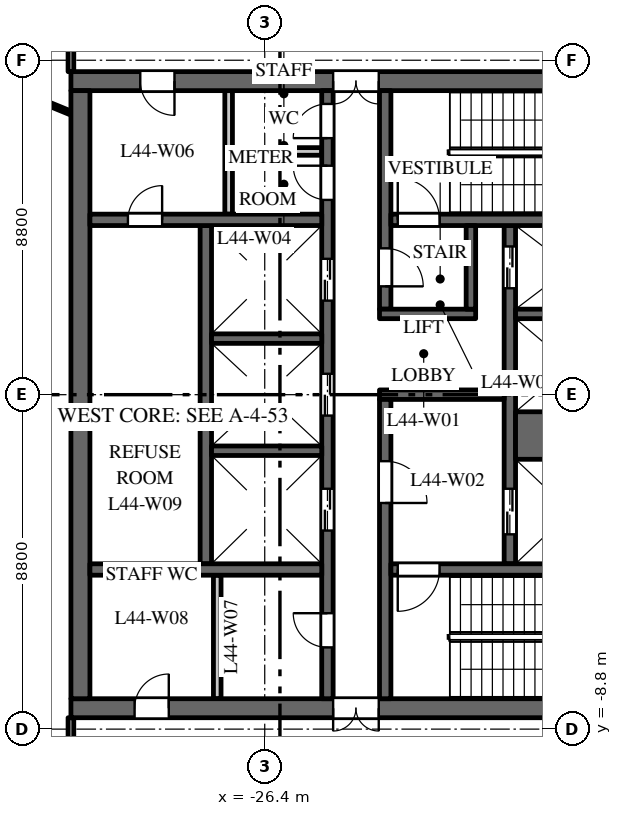
"""IFC4 building model, lengths in metres.
Left out: names, types, materials, properties, quantities, classifications, styles, units other than length and angle.
Written with IfcOpenShell. Run it as: python <this file> out.ifc"""

import sys

from ifc_helpers import new_model, si_unit, direction, frame, frame_2d, origin, place, context, subcontext, project, spatial, rectangle, extrude, element, fill, save


model = new_model("IFC4")
c1 = context("Model", 3, precision=1e-05, world=origin(), true_north=direction((0.0, 1.0)))
c2 = subcontext(c1, "Body", "Model", "MODEL_VIEW")
j1 = project(units=[si_unit("LENGTHUNIT", "METRE"), si_unit("PLANEANGLEUNIT", "RADIAN")], contexts=[c1])
p1 = place(None, origin())
s1 = spatial("IfcSite", under=j1, at=p1, CompositionType="ELEMENT")
p2 = place(p1, origin())
s2 = spatial("IfcBuilding", under=s1, at=p2, CompositionType="ELEMENT")
p3 = place(p2, frame((0.0, 0.0, 190.0)))
s3 = spatial("IfcBuildingStorey", under=s2, at=p3, CompositionType="ELEMENT", Elevation=190.0)
p4 = place(p3, frame((-16.5, 8.25, 0.0), z_axis=(0.0, 0.0, 1.0), x_axis=(-1.0, 0.0, 0.0)))
e1 = element("IfcWall", 1, at=p4, inside=s3, PredefinedType="SHEAR", context=c2, shape_type="SweptSolid", body=[
    extrude(rectangle(XDim=15.0, YDim=0.5, at=frame_2d((7.5, 0.0))), origin(), (0.0, 0.0, 1.0), 3.7),
])
p5 = place(p4, frame((6.9, 0.0, 0.0)))
e2 = element("IfcOpeningElement", 2, at=p5, cuts=e1, PredefinedType="OPENING", context=c2, shape_type="SweptSolid", body=[
    extrude(rectangle(XDim=1.2, YDim=2.1, at=frame_2d((0.6, 1.05))), frame((0.0, 0.26, 0.0), z_axis=(0.0, -1.0, 0.0), x_axis=(1.0, 0.0, 0.0)), (0.0, 0.0, 1.0), 0.52),
])
p6 = place(p4, frame((12.275, 0.0, 0.0)))
e3 = element("IfcOpeningElement", 3, at=p6, cuts=e1, PredefinedType="OPENING", context=c2, shape_type="SweptSolid", body=[
    extrude(rectangle(XDim=0.9, YDim=2.1, at=frame_2d((0.45, 1.05))), frame((0.0, 0.26, 0.0), z_axis=(0.0, -1.0, 0.0), x_axis=(1.0, 0.0, 0.0)), (0.0, 0.0, 1.0), 0.52),
])
p7 = place(p3, frame((-16.5, -8.25, 0.0), z_axis=(0.0, 0.0, 1.0), x_axis=(-1.0, 0.0, 0.0)))
e4 = element("IfcWall", 4, at=p7, inside=s3, PredefinedType="SHEAR", context=c2, shape_type="SweptSolid", body=[
    extrude(rectangle(XDim=15.0, YDim=0.5, at=frame_2d((7.5, 0.0))), origin(), (0.0, 0.0, 1.0), 3.7),
])
p8 = place(p7, frame((6.9, 0.0, 0.0)))
e5 = element("IfcOpeningElement", 5, at=p8, cuts=e4, PredefinedType="OPENING", context=c2, shape_type="SweptSolid", body=[
    extrude(rectangle(XDim=1.2, YDim=2.1, at=frame_2d((0.6, 1.05))), frame((0.0, 0.26, 0.0), z_axis=(0.0, -1.0, 0.0), x_axis=(1.0, 0.0, 0.0)), (0.0, 0.0, 1.0), 0.52),
])
p9 = place(p7, frame((12.425, 0.0, 0.0)))
e6 = element("IfcOpeningElement", 6, at=p9, cuts=e4, PredefinedType="OPENING", context=c2, shape_type="SweptSolid", body=[
    extrude(rectangle(XDim=0.9, YDim=2.1, at=frame_2d((0.45, 1.05))), frame((0.0, 0.26, 0.0), z_axis=(0.0, -1.0, 0.0), x_axis=(1.0, 0.0, 0.0)), (0.0, 0.0, 1.0), 0.52),
])
p10 = place(p3, frame((-27.95, -4.45, 0.0), z_axis=(0.0, 0.0, 1.0), x_axis=(0.0, 1.0, 0.0)))
e7 = element("IfcWall", 7, at=p10, inside=s3, PredefinedType="SHEAR", context=c2, shape_type="SweptSolid", body=[
    extrude(rectangle(XDim=8.9, YDim=0.3, at=frame_2d((4.45, 0.0))), origin(), (0.0, 0.0, 1.0), 3.7),
])
p11 = place(p3, frame((-19.95, -4.45, 0.0), z_axis=(0.0, 0.0, 1.0), x_axis=(0.0, 1.0, 0.0)))
e8 = element("IfcWall", 8, at=p11, inside=s3, PredefinedType="SHEAR", context=c2, shape_type="SweptSolid", body=[
    extrude(rectangle(XDim=8.9, YDim=0.3, at=frame_2d((4.45, 0.0))), origin(), (0.0, 0.0, 1.0), 3.7),
])
p12 = place(p11, frame((0.775, 0.0, 0.0)))
e9 = element("IfcOpeningElement", 9, at=p12, cuts=e8, PredefinedType="OPENING", context=c2, shape_type="SweptSolid", body=[
    extrude(rectangle(XDim=1.2, YDim=2.1, at=frame_2d((0.6, 1.05))), frame((0.0, 0.16, 0.0), z_axis=(0.0, -1.0, 0.0), x_axis=(1.0, 0.0, 0.0)), (0.0, 0.0, 1.0), 0.32),
])
p13 = place(p11, frame((7.25, 0.0, 0.0)))
e10 = element("IfcOpeningElement", 10, at=p13, cuts=e8, PredefinedType="OPENING", context=c2, shape_type="SweptSolid", body=[
    extrude(rectangle(XDim=1.1, YDim=2.1, at=frame_2d((0.55, 1.05))), frame((0.0, 0.16, 0.0), z_axis=(0.0, -1.0, 0.0), x_axis=(1.0, 0.0, 0.0)), (0.0, 0.0, 1.0), 0.32),
])
p14 = place(p3, frame((-24.75, -8.0, 0.0), z_axis=(0.0, 0.0, 1.0), x_axis=(0.0, 1.0, 0.0)))
e11 = element("IfcWall", 11, at=p14, inside=s3, PredefinedType="SHEAR", context=c2, shape_type="SweptSolid", body=[
    extrude(rectangle(XDim=16.0, YDim=0.3, at=frame_2d((8.0, 0.0))), origin(), (0.0, 0.0, 1.0), 3.7),
])
p15 = place(p14, frame((4.425, 0.0, 0.0)))
e12 = element("IfcOpeningElement", 12, at=p15, cuts=e11, PredefinedType="OPENING", context=c2, shape_type="SweptSolid", body=[
    extrude(rectangle(XDim=1.1, YDim=2.1, at=frame_2d((0.55, 1.05))), frame((0.0, 0.16, 0.0), z_axis=(0.0, -1.0, 0.0), x_axis=(1.0, 0.0, 0.0)), (0.0, 0.0, 1.0), 0.32),
])
p16 = place(p14, frame((7.45, 0.0, 0.0)))
e13 = element("IfcOpeningElement", 13, at=p16, cuts=e11, PredefinedType="OPENING", context=c2, shape_type="SweptSolid", body=[
    extrude(rectangle(XDim=1.1, YDim=2.1, at=frame_2d((0.55, 1.05))), frame((0.0, 0.16, 0.0), z_axis=(0.0, -1.0, 0.0), x_axis=(1.0, 0.0, 0.0)), (0.0, 0.0, 1.0), 0.32),
])
p17 = place(p14, frame((10.475, 0.0, 0.0)))
e14 = element("IfcOpeningElement", 14, at=p17, cuts=e11, PredefinedType="OPENING", context=c2, shape_type="SweptSolid", body=[
    extrude(rectangle(XDim=1.1, YDim=2.1, at=frame_2d((0.55, 1.05))), frame((0.0, 0.16, 0.0), z_axis=(0.0, -1.0, 0.0), x_axis=(1.0, 0.0, 0.0)), (0.0, 0.0, 1.0), 0.32),
])
p18 = place(p14, frame((13.125, 0.0, 0.0)))
e15 = element("IfcOpeningElement", 15, at=p18, cuts=e11, PredefinedType="OPENING", context=c2, shape_type="SweptSolid", body=[
    extrude(rectangle(XDim=0.9, YDim=2.1, at=frame_2d((0.45, 1.05))), frame((0.0, 0.16, 0.0), z_axis=(0.0, -1.0, 0.0), x_axis=(1.0, 0.0, 0.0)), (0.0, 0.0, 1.0), 0.32),
])
p19 = place(p14, frame((14.75, 0.0, 0.0)))
e16 = element("IfcOpeningElement", 16, at=p19, cuts=e11, PredefinedType="OPENING", context=c2, shape_type="SweptSolid", body=[
    extrude(rectangle(XDim=0.9, YDim=2.1, at=frame_2d((0.45, 1.05))), frame((0.0, 0.16, 0.0), z_axis=(0.0, -1.0, 0.0), x_axis=(1.0, 0.0, 0.0)), (0.0, 0.0, 1.0), 0.32),
])
p20 = place(p14, frame((1.35, 0.0, 0.0)))
e17 = element("IfcOpeningElement", 17, at=p20, cuts=e11, PredefinedType="OPENING", context=c2, shape_type="SweptSolid", body=[
    extrude(rectangle(XDim=0.9, YDim=2.1, at=frame_2d((0.45, 1.05))), frame((0.0, 0.16, 0.0), z_axis=(0.0, -1.0, 0.0), x_axis=(1.0, 0.0, 0.0)), (0.0, 0.0, 1.0), 0.32),
])
p21 = place(p3, frame((-20.1, 0.0, 0.0), z_axis=(0.0, 0.0, 1.0), x_axis=(-1.0, 0.0, 0.0)))
e18 = element("IfcWall", 18, at=p21, inside=s3, PredefinedType="SHEAR", context=c2, shape_type="SweptSolid", body=[
    extrude(rectangle(XDim=3.28, YDim=0.25, at=frame_2d((1.64, 0.0))), origin(), (0.0, 0.0, 1.0), 3.7),
])
p22 = place(p3, frame((-31.25, -8.0, 0.0), z_axis=(0.0, 0.0, 1.0), x_axis=(0.0, 1.0, 0.0)))
e19 = element("IfcWall", 19, at=p22, inside=s3, PredefinedType="SHEAR", context=c2, shape_type="SweptSolid", body=[
    extrude(rectangle(XDim=16.0, YDim=0.5, at=frame_2d((8.0, 0.0))), origin(), (0.0, 0.0, 1.0), 3.7),
])
p23 = place(p3, frame((-24.9, 4.6, 0.0), z_axis=(0.0, 0.0, 1.0), x_axis=(-1.0, 0.0, 0.0)))
e20 = element("IfcWall", 20, at=p23, inside=s3, PredefinedType="SHEAR", context=c2, shape_type="SweptSolid", body=[
    extrude(rectangle(XDim=6.1, YDim=0.3, at=frame_2d((3.05, 0.0))), origin(), (0.0, 0.0, 1.0), 3.7),
])
p24 = place(p23, frame((4.2, 0.0, 0.0)))
e21 = element("IfcOpeningElement", 21, at=p24, cuts=e20, PredefinedType="OPENING", context=c2, shape_type="SweptSolid", body=[
    extrude(rectangle(XDim=0.9, YDim=2.1, at=frame_2d((0.45, 1.05))), frame((0.0, 0.16, 0.0), z_axis=(0.0, -1.0, 0.0), x_axis=(1.0, 0.0, 0.0)), (0.0, 0.0, 1.0), 0.32),
])
for number, where, z_axis, x_axis in (
    (22, (-27.35, 4.75, 0.0), (0.0, 0.0, 1.0), (0.0, 1.0, 0.0)),
    (23, (-27.65, -8.0, 0.0), (0.0, 0.0, 1.0), (0.0, 1.0, 0.0)),
):
    element("IfcWall", number, at=place(p3, frame(where, z_axis=z_axis, x_axis=x_axis)), inside=s3, PredefinedType="PARTITIONING", context=c2, shape_type="SweptSolid", body=[
        extrude(rectangle(XDim=3.25, YDim=0.2, at=frame_2d((1.625, 0.0))), origin(), (0.0, 0.0, 1.0), 3.7),
    ])
p25 = place(p3, frame((-24.9, 6.4, 0.0), z_axis=(0.0, 0.0, 1.0), x_axis=(-1.0, 0.0, 0.0)))
e24 = element("IfcWall", 24, at=p25, inside=s3, PredefinedType="PARTITIONING", context=c2, shape_type="SweptSolid", body=[
    extrude(rectangle(XDim=2.35, YDim=0.2, at=frame_2d((1.175, 0.0))), origin(), (0.0, 0.0, 1.0), 3.7),
])
p26 = place(p3, frame((-24.9, -4.6, 0.0), z_axis=(0.0, 0.0, 1.0), x_axis=(-1.0, 0.0, 0.0)))
e25 = element("IfcWall", 25, at=p26, inside=s3, PredefinedType="SHEAR", context=c2, shape_type="SweptSolid", body=[
    extrude(rectangle(XDim=6.1, YDim=0.3, at=frame_2d((3.05, 0.0))), origin(), (0.0, 0.0, 1.0), 3.7),
])
p27 = place(p3, frame((-16.9, -1.075, 0.0), z_axis=(0.0, 0.0, 1.0), x_axis=(-1.0, 0.0, 0.0)))
e26 = element("IfcWall", 26, at=p27, inside=s3, PredefinedType="SHEAR", context=c2, shape_type="SweptSolid", body=[
    extrude(rectangle(XDim=2.9, YDim=1.25, at=frame_2d((1.45, 0.0))), origin(), (0.0, 0.0, 1.0), 3.7),
])
for number, where, z_axis, x_axis in (
    (27, (-16.9, 2.125, 0.0), (0.0, 0.0, 1.0), (-1.0, 0.0, 0.0)),
    (28, (-24.9, -1.475, 0.0), (0.0, 0.0, 1.0), (-1.0, 0.0, 0.0)),
    (29, (-24.9, 1.475, 0.0), (0.0, 0.0, 1.0), (-1.0, 0.0, 0.0)),
):
    element("IfcWall", number, at=place(p3, frame(where, z_axis=z_axis, x_axis=x_axis)), inside=s3, PredefinedType="SHEAR", context=c2, shape_type="SweptSolid", body=[
        extrude(rectangle(XDim=2.9, YDim=0.25, at=frame_2d((1.45, 0.0))), origin(), (0.0, 0.0, 1.0), 3.7),
    ])
p28 = place(p3, frame((-23.23, 2.25, 0.0), z_axis=(0.0, 0.0, 1.0), x_axis=(0.0, 1.0, 0.0)))
e30 = element("IfcWall", 30, at=p28, inside=s3, PredefinedType="SHEAR", context=c2, shape_type="SweptSolid", body=[
    extrude(rectangle(XDim=5.75, YDim=0.3, at=frame_2d((2.875, 0.0))), origin(), (0.0, 0.0, 1.0), 3.7),
])
p29 = place(p28, frame((0.6, 0.0, 0.0)))
e31 = element("IfcOpeningElement", 31, at=p29, cuts=e30, PredefinedType="OPENING", context=c2, shape_type="SweptSolid", body=[
    extrude(rectangle(XDim=1.0, YDim=2.1, at=frame_2d((0.5, 1.05))), frame((0.0, 0.16, 0.0), z_axis=(0.0, -1.0, 0.0), x_axis=(1.0, 0.0, 0.0)), (0.0, 0.0, 1.0), 0.32),
])
p30 = place(p3, frame((-23.23, -8.0, 0.0), z_axis=(0.0, 0.0, 1.0), x_axis=(0.0, 1.0, 0.0)))
e32 = element("IfcWall", 32, at=p30, inside=s3, PredefinedType="SHEAR", context=c2, shape_type="SweptSolid", body=[
    extrude(rectangle(XDim=7.875, YDim=0.3, at=frame_2d((3.938, 0.0))), origin(), (0.0, 0.0, 1.0), 3.7),
])
p31 = place(p30, frame((5.15, 0.0, 0.0)))
e33 = element("IfcOpeningElement", 33, at=p31, cuts=e32, PredefinedType="OPENING", context=c2, shape_type="SweptSolid", body=[
    extrude(rectangle(XDim=1.1, YDim=2.1, at=frame_2d((0.55, 1.05))), frame((0.0, 0.16, 0.0), z_axis=(0.0, -1.0, 0.0), x_axis=(1.0, 0.0, 0.0)), (0.0, 0.0, 1.0), 0.32),
])
p32 = place(p3, frame((-16.9, 4.6, 0.0), z_axis=(0.0, 0.0, 1.0), x_axis=(-1.0, 0.0, 0.0)))
e34 = element("IfcWall", 34, at=p32, inside=s3, PredefinedType="SHEAR", context=c2, shape_type="SweptSolid", body=[
    extrude(rectangle(XDim=6.18, YDim=0.3, at=frame_2d((3.09, 0.0))), origin(), (0.0, 0.0, 1.0), 3.7),
])
p33 = place(p32, frame((4.9, 0.0, 0.0)))
e35 = element("IfcOpeningElement", 35, at=p33, cuts=e34, PredefinedType="OPENING", context=c2, shape_type="SweptSolid", body=[
    extrude(rectangle(XDim=1.1, YDim=2.1, at=frame_2d((0.55, 1.05))), frame((0.0, 0.16, 0.0), z_axis=(0.0, -1.0, 0.0), x_axis=(1.0, 0.0, 0.0)), (0.0, 0.0, 1.0), 0.32),
])
p34 = place(p3, frame((-16.9, -4.6, 0.0), z_axis=(0.0, 0.0, 1.0), x_axis=(-1.0, 0.0, 0.0)))
e36 = element("IfcWall", 36, at=p34, inside=s3, PredefinedType="SHEAR", context=c2, shape_type="SweptSolid", body=[
    extrude(rectangle(XDim=6.18, YDim=0.3, at=frame_2d((3.09, 0.0))), origin(), (0.0, 0.0, 1.0), 3.7),
])
p35 = place(p34, frame((4.9, 0.0, 0.0)))
e37 = element("IfcOpeningElement", 37, at=p35, cuts=e36, PredefinedType="OPENING", context=c2, shape_type="SweptSolid", body=[
    extrude(rectangle(XDim=1.1, YDim=2.1, at=frame_2d((0.55, 1.05))), frame((0.0, 0.16, 0.0), z_axis=(0.0, -1.0, 0.0), x_axis=(1.0, 0.0, 0.0)), (0.0, 0.0, 1.0), 0.32),
])
p36 = place(p3, frame((-20.85, 2.125, 0.0), z_axis=(0.0, 0.0, 1.0), x_axis=(-1.0, 0.0, 0.0)))
e38 = element("IfcWall", 38, at=p36, inside=s3, PredefinedType="SHEAR", context=c2, shape_type="SweptSolid", body=[
    extrude(rectangle(XDim=2.53, YDim=0.25, at=frame_2d((1.265, 0.0))), origin(), (0.0, 0.0, 1.0), 3.7),
])
p37 = place(p3, frame((-20.975, 2.25, 0.0), z_axis=(0.0, 0.0, 1.0), x_axis=(0.0, 1.0, 0.0)))
e39 = element("IfcWall", 39, at=p37, inside=s3, PredefinedType="SHEAR", context=c2, shape_type="SweptSolid", body=[
    extrude(rectangle(XDim=2.2, YDim=0.25, at=frame_2d((1.1, 0.0))), origin(), (0.0, 0.0, 1.0), 3.7),
])
p38 = place(p3, frame((-34.234, 8.53, 0.0), z_axis=(0.0, 0.0, 1.0), x_axis=(0.925344112436, -0.379128307542, 0.0)))
e40 = element("IfcWall", 40, at=p38, inside=s3, PredefinedType="PARTITIONING", context=c2, shape_type="SweptSolid", body=[
    extrude(rectangle(XDim=2.954, YDim=0.1, at=frame_2d((1.477, 0.0))), origin(), (0.0, 0.0, 1.0), 2.9),
])
for number, where, z_axis, x_axis in (
    (41, (-31.5, -10.7, 0.0), (0.0, 0.0, 1.0), (0.0, 1.0, 0.0)),
    (42, (-31.5, 8.5, 0.0), (0.0, 0.0, 1.0), (0.0, 1.0, 0.0)),
):
    element("IfcWall", number, at=place(p3, frame(where, z_axis=z_axis, x_axis=x_axis)), inside=s3, PredefinedType="PARTITIONING", context=c2, shape_type="SweptSolid", body=[
        extrude(rectangle(XDim=2.2, YDim=0.15, at=frame_2d((1.1, 0.0))), origin(), (0.0, 0.0, 1.0), 3.7),
    ])
p39 = place(p12, origin())
e43 = element("IfcDoor", 43, at=p39, inside=s3, OperationType="DOUBLE_DOOR_SLIDING", PredefinedType="DOOR", context=c2, shape_type="SweptSolid", body=[
    extrude(rectangle(XDim=1.2, YDim=2.1, at=frame_2d((0.6, 1.05))), frame((0.0, 0.025, 0.0), z_axis=(0.0, -1.0, 0.0), x_axis=(1.0, 0.0, 0.0)), (0.0, 0.0, 1.0), 0.05),
])
fill(e9, e43)
p40 = place(p13, origin())
e44 = element("IfcDoor", 44, at=p40, inside=s3, OperationType="DOUBLE_DOOR_SLIDING", PredefinedType="DOOR", context=c2, shape_type="SweptSolid", body=[
    extrude(rectangle(XDim=1.1, YDim=2.1, at=frame_2d((0.55, 1.05))), frame((0.0, 0.025, 0.0), z_axis=(0.0, -1.0, 0.0), x_axis=(1.0, 0.0, 0.0)), (0.0, 0.0, 1.0), 0.05),
])
fill(e10, e44)
p41 = place(p15, origin())
e45 = element("IfcDoor", 45, at=p41, inside=s3, OperationType="DOUBLE_DOOR_SLIDING", PredefinedType="DOOR", context=c2, shape_type="SweptSolid", body=[
    extrude(rectangle(XDim=1.1, YDim=2.1, at=frame_2d((0.55, 1.05))), frame((0.0, 0.025, 0.0), z_axis=(0.0, -1.0, 0.0), x_axis=(1.0, 0.0, 0.0)), (0.0, 0.0, 1.0), 0.05),
])
fill(e12, e45)
p42 = place(p16, origin())
e46 = element("IfcDoor", 46, at=p42, inside=s3, OperationType="DOUBLE_DOOR_SLIDING", PredefinedType="DOOR", context=c2, shape_type="SweptSolid", body=[
    extrude(rectangle(XDim=1.1, YDim=2.1, at=frame_2d((0.55, 1.05))), frame((0.0, 0.025, 0.0), z_axis=(0.0, -1.0, 0.0), x_axis=(1.0, 0.0, 0.0)), (0.0, 0.0, 1.0), 0.05),
])
fill(e13, e46)
p43 = place(p17, origin())
e47 = element("IfcDoor", 47, at=p43, inside=s3, OperationType="DOUBLE_DOOR_SLIDING", PredefinedType="DOOR", context=c2, shape_type="SweptSolid", body=[
    extrude(rectangle(XDim=1.1, YDim=2.1, at=frame_2d((0.55, 1.05))), frame((0.0, 0.025, 0.0), z_axis=(0.0, -1.0, 0.0), x_axis=(1.0, 0.0, 0.0)), (0.0, 0.0, 1.0), 0.05),
])
fill(e14, e47)
p44 = place(p33, origin())
e48 = element("IfcDoor", 48, at=p44, inside=s3, OperationType="SINGLE_SWING_RIGHT", PredefinedType="DOOR", context=c2, shape_type="SweptSolid", body=[
    extrude(rectangle(XDim=1.1, YDim=2.1, at=frame_2d((0.55, 1.05))), frame((0.0, 0.025, 0.0), z_axis=(0.0, -1.0, 0.0), x_axis=(1.0, 0.0, 0.0)), (0.0, 0.0, 1.0), 0.05),
])
fill(e35, e48)
p45 = place(p35, origin())
e49 = element("IfcDoor", 49, at=p45, inside=s3, OperationType="SINGLE_SWING_LEFT", PredefinedType="DOOR", context=c2, shape_type="SweptSolid", body=[
    extrude(rectangle(XDim=1.1, YDim=2.1, at=frame_2d((0.55, 1.05))), frame((0.0, 0.025, 0.0), z_axis=(0.0, -1.0, 0.0), x_axis=(1.0, 0.0, 0.0)), (0.0, 0.0, 1.0), 0.05),
])
fill(e37, e49)
p46 = place(p31, origin())
e50 = element("IfcDoor", 50, at=p46, inside=s3, OperationType="SINGLE_SWING_LEFT", PredefinedType="DOOR", context=c2, shape_type="SweptSolid", body=[
    extrude(rectangle(XDim=1.1, YDim=2.1, at=frame_2d((0.55, 1.05))), frame((0.0, 0.025, 0.0), z_axis=(0.0, -1.0, 0.0), x_axis=(1.0, 0.0, 0.0)), (0.0, 0.0, 1.0), 0.05),
])
fill(e33, e50)
p47 = place(p29, origin())
e51 = element("IfcDoor", 51, at=p47, inside=s3, OperationType="SINGLE_SWING_LEFT", PredefinedType="DOOR", context=c2, shape_type="SweptSolid", body=[
    extrude(rectangle(XDim=1.0, YDim=2.1, at=frame_2d((0.5, 1.05))), frame((0.0, 0.025, 0.0), z_axis=(0.0, -1.0, 0.0), x_axis=(1.0, 0.0, 0.0)), (0.0, 0.0, 1.0), 0.05),
])
fill(e31, e51)
p48 = place(p5, origin())
e52 = element("IfcDoor", 52, at=p48, inside=s3, OperationType="DOUBLE_DOOR_DOUBLE_SWING", PredefinedType="DOOR", context=c2, shape_type="SweptSolid", body=[
    extrude(rectangle(XDim=1.2, YDim=2.1, at=frame_2d((0.6, 1.05))), frame((0.0, 0.025, 0.0), z_axis=(0.0, -1.0, 0.0), x_axis=(1.0, 0.0, 0.0)), (0.0, 0.0, 1.0), 0.05),
])
fill(e2, e52)
p49 = place(p8, origin())
e53 = element("IfcDoor", 53, at=p49, inside=s3, OperationType="DOUBLE_DOOR_DOUBLE_SWING", PredefinedType="DOOR", context=c2, shape_type="SweptSolid", body=[
    extrude(rectangle(XDim=1.2, YDim=2.1, at=frame_2d((0.6, 1.05))), frame((0.0, 0.025, 0.0), z_axis=(0.0, -1.0, 0.0), x_axis=(1.0, 0.0, 0.0)), (0.0, 0.0, 1.0), 0.05),
])
fill(e5, e53)
p50 = place(p18, origin())
e54 = element("IfcDoor", 54, at=p50, inside=s3, OperationType="SINGLE_SWING_LEFT", PredefinedType="DOOR", context=c2, shape_type="SweptSolid", body=[
    extrude(rectangle(XDim=0.9, YDim=2.1, at=frame_2d((0.45, 1.05))), frame((0.0, 0.025, 0.0), z_axis=(0.0, -1.0, 0.0), x_axis=(1.0, 0.0, 0.0)), (0.0, 0.0, 1.0), 0.05),
])
fill(e15, e54)
p51 = place(p19, origin())
e55 = element("IfcDoor", 55, at=p51, inside=s3, OperationType="SINGLE_SWING_RIGHT", PredefinedType="DOOR", context=c2, shape_type="SweptSolid", body=[
    extrude(rectangle(XDim=0.9, YDim=2.1, at=frame_2d((0.45, 1.05))), frame((0.0, 0.025, 0.0), z_axis=(0.0, -1.0, 0.0), x_axis=(1.0, 0.0, 0.0)), (0.0, 0.0, 1.0), 0.05),
])
fill(e16, e55)
p52 = place(p6, origin())
e56 = element("IfcDoor", 56, at=p52, inside=s3, OperationType="SINGLE_SWING_RIGHT", PredefinedType="DOOR", context=c2, shape_type="SweptSolid", body=[
    extrude(rectangle(XDim=0.9, YDim=2.1, at=frame_2d((0.45, 1.05))), frame((0.0, 0.025, 0.0), z_axis=(0.0, -1.0, 0.0), x_axis=(1.0, 0.0, 0.0)), (0.0, 0.0, 1.0), 0.05),
])
fill(e3, e56)
p53 = place(p20, origin())
e57 = element("IfcDoor", 57, at=p53, inside=s3, OperationType="SINGLE_SWING_LEFT", PredefinedType="DOOR", context=c2, shape_type="SweptSolid", body=[
    extrude(rectangle(XDim=0.9, YDim=2.1, at=frame_2d((0.45, 1.05))), frame((0.0, 0.025, 0.0), z_axis=(0.0, -1.0, 0.0), x_axis=(1.0, 0.0, 0.0)), (0.0, 0.0, 1.0), 0.05),
])
fill(e17, e57)
p54 = place(p9, origin())
e58 = element("IfcDoor", 58, at=p54, inside=s3, OperationType="SINGLE_SWING_LEFT", PredefinedType="DOOR", context=c2, shape_type="SweptSolid", body=[
    extrude(rectangle(XDim=0.9, YDim=2.1, at=frame_2d((0.45, 1.05))), frame((0.0, 0.025, 0.0), z_axis=(0.0, -1.0, 0.0), x_axis=(1.0, 0.0, 0.0)), (0.0, 0.0, 1.0), 0.05),
])
fill(e6, e58)
p55 = place(p24, origin())
e59 = element("IfcDoor", 59, at=p55, inside=s3, OperationType="SINGLE_SWING_LEFT", PredefinedType="DOOR", context=c2, shape_type="SweptSolid", body=[
    extrude(rectangle(XDim=0.9, YDim=2.1, at=frame_2d((0.45, 1.05))), frame((0.0, 0.025, 0.0), z_axis=(0.0, -1.0, 0.0), x_axis=(1.0, 0.0, 0.0)), (0.0, 0.0, 1.0), 0.05),
])
fill(e21, e59)
save(model, sys.argv[1])
